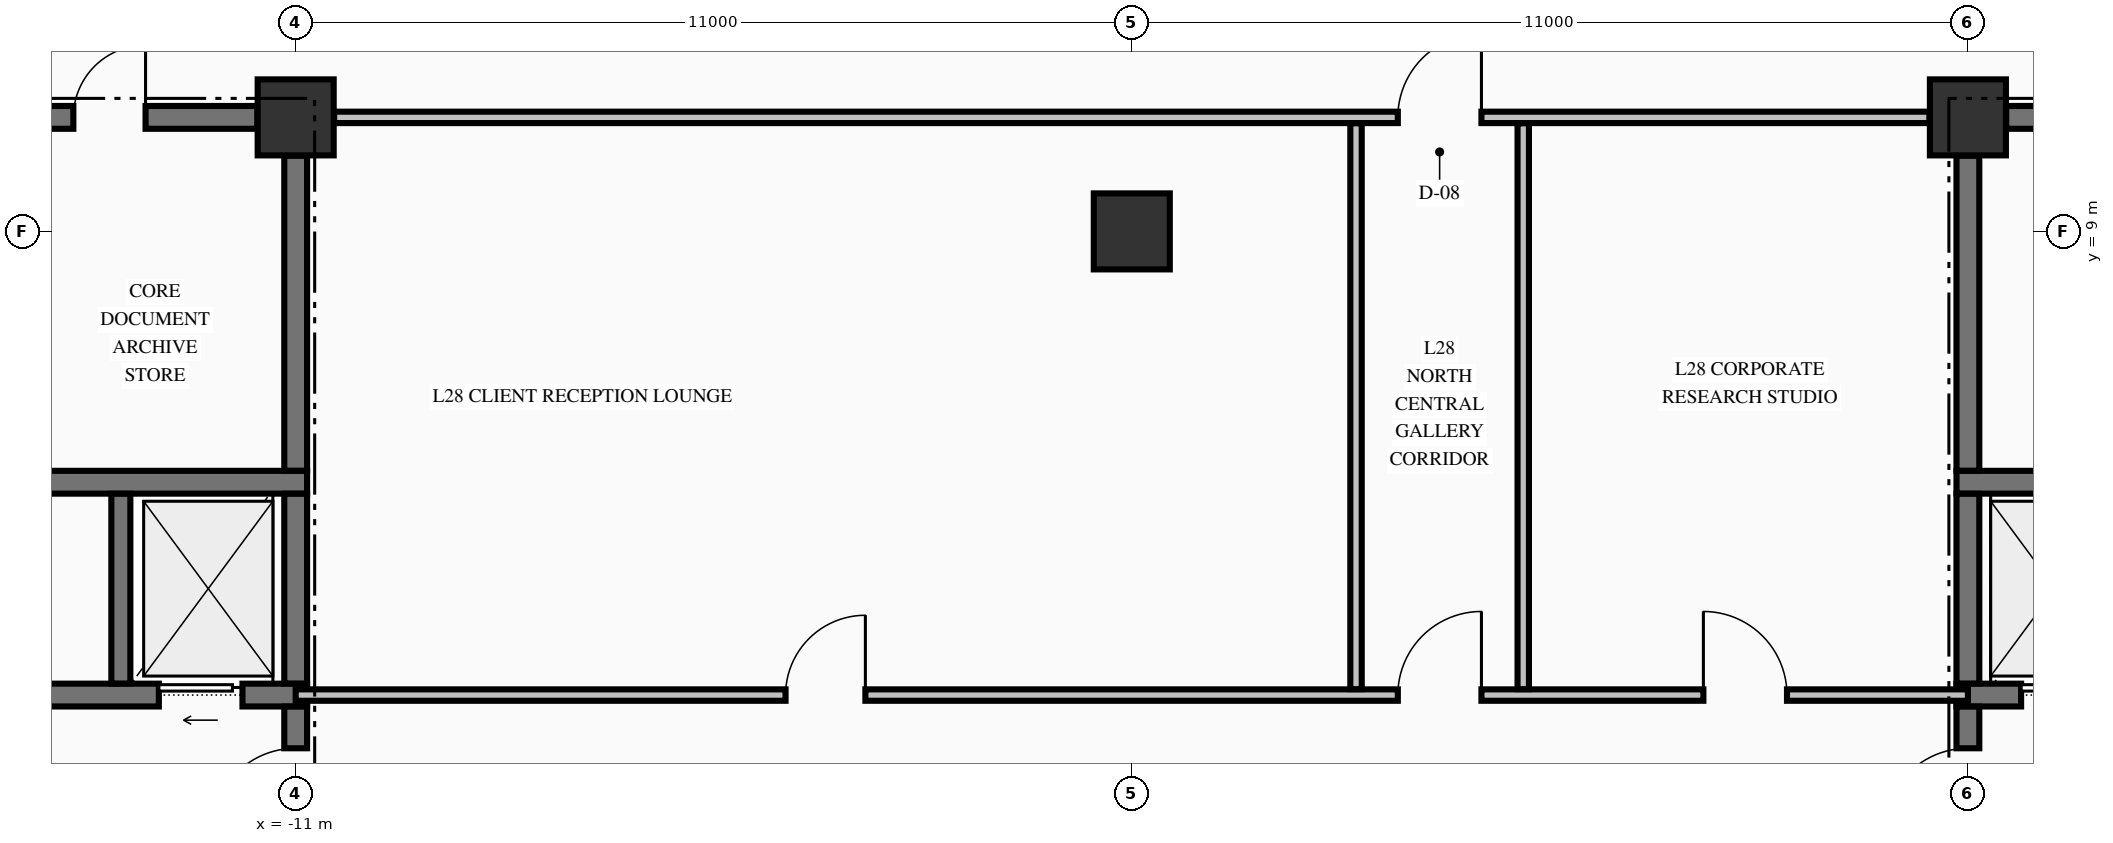
"""IFC4 building model, lengths in metres.
Left out: names, types, materials, properties, quantities, classifications, styles, units other than length and angle.
Written with IfcOpenShell. Run it as: python <this file> out.ifc"""

import sys

from ifc_helpers import new_model, si_unit, direction, frame, frame_2d, origin, origin_2d, place, context, subcontext, project, spatial, rectangle, extrude, element, fill, save


model = new_model("IFC4")
c1 = context("Model", 3, precision=1e-05, world=origin(), true_north=direction((0.0, 1.0)))
c2 = subcontext(c1, "Body", "Model", "MODEL_VIEW")
j1 = project(units=[si_unit("LENGTHUNIT", "METRE"), si_unit("PLANEANGLEUNIT", "RADIAN")], contexts=[c1])
p1 = place(None, origin())
s1 = spatial("IfcSite", under=j1, at=p1, CompositionType="ELEMENT")
p2 = place(p1, origin())
s2 = spatial("IfcBuilding", under=s1, at=p2, CompositionType="ELEMENT")
p3 = place(p2, frame((0.0, 0.0, 112.78)))
s3 = spatial("IfcBuildingStorey", under=s2, at=p3, CompositionType="ELEMENT", Elevation=112.78)
for number, where, z_axis, x_axis in (
    (1, (-11.0, 10.5, -0.25), (0.0, 0.0, 1.0), (1.0, 0.0, 0.0)),
    (2, (11.0, 10.5, -0.25), (0.0, 0.0, 1.0), (1.0, 0.0, 0.0)),
    (3, (0.0, 9.0, -0.25), (0.0, 0.0, 1.0), (1.0, 0.0, 0.0)),
):
    element("IfcColumn", number, at=place(p3, frame(where, z_axis=z_axis, x_axis=x_axis)), inside=s3, PredefinedType="COLUMN", context=c2, shape_type="SweptSolid", body=[
        extrude(rectangle(XDim=1.0, YDim=1.0, at=origin_2d()), origin(), (0.0, 0.0, 1.0), 3.395),
    ])
p4 = place(p3, frame((-14.875, 2.9, 0.0), z_axis=(0.0, 0.0, 1.0), x_axis=(1.0, 0.0, 0.0)))
e4 = element("IfcWall", 4, at=p4, inside=s3, PredefinedType="SHEAR", context=c2, shape_type="SweptSolid", body=[
    extrude(rectangle(XDim=4.025, YDim=0.3, at=frame_2d((2.012, 0.0))), origin(), (0.0, 0.0, 1.0), 3.145),
])
p5 = place(p4, frame((2.075, 0.0, 0.0)))
e5 = element("IfcOpeningElement", 5, at=p5, cuts=e4, PredefinedType="OPENING", context=c2, shape_type="SweptSolid", body=[
    extrude(rectangle(XDim=1.1, YDim=2.2, at=frame_2d((0.55, 1.1))), frame((0.0, 0.16, 0.0), z_axis=(0.0, -1.0, 0.0), x_axis=(1.0, 0.0, 0.0)), (0.0, 0.0, 1.0), 0.32),
])
p6 = place(p3, frame((10.85, 2.9, 0.0), z_axis=(0.0, 0.0, 1.0), x_axis=(1.0, 0.0, 0.0)))
e6 = element("IfcWall", 6, at=p6, inside=s3, PredefinedType="SHEAR", context=c2, shape_type="SweptSolid", body=[
    extrude(rectangle(XDim=4.025, YDim=0.3, at=frame_2d((2.012, 0.0))), origin(), (0.0, 0.0, 1.0), 3.145),
])
p7 = place(p6, frame((0.85, 0.0, 0.0)))
e7 = element("IfcOpeningElement", 7, at=p7, cuts=e6, PredefinedType="OPENING", context=c2, shape_type="SweptSolid", body=[
    extrude(rectangle(XDim=1.1, YDim=2.2, at=frame_2d((0.55, 1.1))), frame((0.0, 0.16, 0.0), z_axis=(0.0, -1.0, 0.0), x_axis=(1.0, 0.0, 0.0)), (0.0, 0.0, 1.0), 0.32),
])
for number, where, z_axis, x_axis in (
    (8, (-14.875, 5.7, 0.0), (0.0, 0.0, 1.0), (1.0, 0.0, 0.0)),
    (9, (10.85, 5.7, 0.0), (0.0, 0.0, 1.0), (1.0, 0.0, 0.0)),
):
    element("IfcWall", number, at=place(p3, frame(where, z_axis=z_axis, x_axis=x_axis)), inside=s3, PredefinedType="SHEAR", context=c2, shape_type="SweptSolid", body=[
        extrude(rectangle(XDim=4.025, YDim=0.3, at=frame_2d((2.012, 0.0))), origin(), (0.0, 0.0, 1.0), 3.145),
    ])
p8 = place(p3, frame((-14.7, 10.5, 0.0), z_axis=(0.0, 0.0, 1.0), x_axis=(1.0, 0.0, 0.0)))
e10 = element("IfcWall", 10, at=p8, inside=s3, PredefinedType="SHEAR", context=c2, shape_type="SweptSolid", body=[
    extrude(rectangle(XDim=3.196, YDim=0.3, at=frame_2d((1.598, 0.0))), origin(), (0.0, 0.0, 1.0), 3.145),
])
p9 = place(p8, frame((0.775, 0.0, 0.0)))
e11 = element("IfcOpeningElement", 11, at=p9, cuts=e10, PredefinedType="OPENING", context=c2, shape_type="SweptSolid", body=[
    extrude(rectangle(XDim=0.95, YDim=2.15, at=frame_2d((0.475, 1.075))), frame((0.0, 0.16, 0.0), z_axis=(0.0, -1.0, 0.0), x_axis=(1.0, 0.0, 0.0)), (0.0, 0.0, 1.0), 0.32),
])
p10 = place(p3, frame((11.504, 10.5, 0.0), z_axis=(0.0, 0.0, 1.0), x_axis=(1.0, 0.0, 0.0)))
e12 = element("IfcWall", 12, at=p10, inside=s3, PredefinedType="SHEAR", context=c2, shape_type="SweptSolid", body=[
    extrude(rectangle(XDim=3.196, YDim=0.3, at=frame_2d((1.598, 0.0))), origin(), (0.0, 0.0, 1.0), 3.145),
])
p11 = place(p10, frame((2.001, 0.0, 0.0)))
e13 = element("IfcOpeningElement", 13, at=p11, cuts=e12, PredefinedType="OPENING", context=c2, shape_type="SweptSolid", body=[
    extrude(rectangle(XDim=0.95, YDim=2.15, at=frame_2d((0.475, 1.075))), frame((0.0, 0.16, 0.0), z_axis=(0.0, -1.0, 0.0), x_axis=(1.0, 0.0, 0.0)), (0.0, 0.0, 1.0), 0.32),
])
p12 = place(p3, frame((-11.0, 2.9, 0.0), z_axis=(0.0, 0.0, 1.0), x_axis=(1.0, 0.0, 0.0)))
e14 = element("IfcWall", 14, at=p12, inside=s3, PredefinedType="PARTITIONING", context=c2, shape_type="SweptSolid", body=[
    extrude(rectangle(XDim=22.0, YDim=0.15, at=frame_2d((11.0, 0.0))), origin(), (0.0, 0.0, 1.0), 3.145),
])
p13 = place(p12, frame((14.5, 0.0, 0.0)))
e15 = element("IfcOpeningElement", 15, at=p13, cuts=e14, PredefinedType="OPENING", context=c2, shape_type="SweptSolid", body=[
    extrude(rectangle(XDim=1.1, YDim=2.15, at=frame_2d((0.55, 1.075))), frame((0.0, 0.085, 0.0), z_axis=(0.0, -1.0, 0.0), x_axis=(1.0, 0.0, 0.0)), (0.0, 0.0, 1.0), 0.17),
])
p14 = place(p12, frame((6.445, 0.0, 0.0)))
e16 = element("IfcOpeningElement", 16, at=p14, cuts=e14, PredefinedType="OPENING", context=c2, shape_type="SweptSolid", body=[
    extrude(rectangle(XDim=1.05, YDim=2.15, at=frame_2d((0.525, 1.075))), frame((0.0, 0.085, 0.0), z_axis=(0.0, -1.0, 0.0), x_axis=(1.0, 0.0, 0.0)), (0.0, 0.0, 1.0), 0.17),
])
p15 = place(p12, frame((18.52, 0.0, 0.0)))
e17 = element("IfcOpeningElement", 17, at=p15, cuts=e14, PredefinedType="OPENING", context=c2, shape_type="SweptSolid", body=[
    extrude(rectangle(XDim=1.1, YDim=2.15, at=frame_2d((0.55, 1.075))), frame((0.0, 0.085, 0.0), z_axis=(0.0, -1.0, 0.0), x_axis=(1.0, 0.0, 0.0)), (0.0, 0.0, 1.0), 0.17),
])
p16 = place(p3, frame((-10.494, 10.5, 0.0), z_axis=(0.0, 0.0, 1.0), x_axis=(1.0, 0.0, 0.0)))
e18 = element("IfcWall", 18, at=p16, inside=s3, PredefinedType="PARTITIONING", context=c2, shape_type="SweptSolid", body=[
    extrude(rectangle(XDim=20.988, YDim=0.15, at=frame_2d((10.494, 0.0))), origin(), (0.0, 0.0, 1.0), 3.145),
])
p17 = place(p16, frame((13.994, 0.0, 0.0)))
e19 = element("IfcOpeningElement", 19, at=p17, cuts=e18, PredefinedType="OPENING", context=c2, shape_type="SweptSolid", body=[
    extrude(rectangle(XDim=1.1, YDim=2.15, at=frame_2d((0.55, 1.075))), frame((0.0, 0.085, 0.0), z_axis=(0.0, -1.0, 0.0), x_axis=(1.0, 0.0, 0.0)), (0.0, 0.0, 1.0), 0.17),
])
p18 = place(p3, frame((-13.3, 3.052, 0.0), z_axis=(0.0, 0.0, 1.0), x_axis=(0.0, 1.0, 0.0)))
e20 = element("IfcWall", 20, at=p18, inside=s3, PredefinedType="SOLIDWALL", context=c2, shape_type="SweptSolid", body=[
    extrude(rectangle(XDim=2.496, YDim=0.25, at=frame_2d((1.248, 0.0))), origin(), (0.0, 0.0, 1.0), 3.145),
])
p19 = place(p3, frame((-11.0, 0.504, 0.0), z_axis=(0.0, 0.0, 1.0), x_axis=(0.0, 1.0, 0.0)))
e21 = element("IfcWall", 21, at=p19, inside=s3, PredefinedType="SHEAR", context=c2, shape_type="SweptSolid", body=[
    extrude(rectangle(XDim=2.244, YDim=0.3, at=frame_2d((1.122, 0.0))), origin(), (0.0, 0.0, 1.0), 3.145),
])
p20 = place(p19, frame((0.596, 0.0, 0.0)))
e22 = element("IfcOpeningElement", 22, at=p20, cuts=e21, PredefinedType="OPENING", context=c2, shape_type="SweptSolid", body=[
    extrude(rectangle(XDim=1.1, YDim=2.15, at=frame_2d((0.55, 1.075))), frame((0.0, 0.16, 0.0), z_axis=(0.0, -1.0, 0.0), x_axis=(1.0, 0.0, 0.0)), (0.0, 0.0, 1.0), 0.32),
])
p21 = place(p3, frame((-11.0, 3.052, 0.0), z_axis=(0.0, 0.0, 1.0), x_axis=(0.0, 1.0, 0.0)))
e23 = element("IfcWall", 23, at=p21, inside=s3, PredefinedType="SHEAR", context=c2, shape_type="SweptSolid", body=[
    extrude(rectangle(XDim=2.496, YDim=0.3, at=frame_2d((1.248, 0.0))), origin(), (0.0, 0.0, 1.0), 3.145),
])
p22 = place(p3, frame((-11.0, 5.852, 0.0), z_axis=(0.0, 0.0, 1.0), x_axis=(0.0, 1.0, 0.0)))
e24 = element("IfcWall", 24, at=p22, inside=s3, PredefinedType="SHEAR", context=c2, shape_type="SweptSolid", body=[
    extrude(rectangle(XDim=4.144, YDim=0.3, at=frame_2d((2.072, 0.0))), origin(), (0.0, 0.0, 1.0), 3.145),
])
p23 = place(p3, frame((11.0, 0.504, 0.0), z_axis=(0.0, 0.0, 1.0), x_axis=(0.0, 1.0, 0.0)))
e25 = element("IfcWall", 25, at=p23, inside=s3, PredefinedType="SHEAR", context=c2, shape_type="SweptSolid", body=[
    extrude(rectangle(XDim=2.244, YDim=0.3, at=frame_2d((1.122, 0.0))), origin(), (0.0, 0.0, 1.0), 3.145),
])
p24 = place(p23, frame((0.596, 0.0, 0.0)))
e26 = element("IfcOpeningElement", 26, at=p24, cuts=e25, PredefinedType="OPENING", context=c2, shape_type="SweptSolid", body=[
    extrude(rectangle(XDim=1.1, YDim=2.15, at=frame_2d((0.55, 1.075))), frame((0.0, 0.16, 0.0), z_axis=(0.0, -1.0, 0.0), x_axis=(1.0, 0.0, 0.0)), (0.0, 0.0, 1.0), 0.32),
])
p25 = place(p3, frame((11.0, 3.052, 0.0), z_axis=(0.0, 0.0, 1.0), x_axis=(0.0, 1.0, 0.0)))
e27 = element("IfcWall", 27, at=p25, inside=s3, PredefinedType="SHEAR", context=c2, shape_type="SweptSolid", body=[
    extrude(rectangle(XDim=2.496, YDim=0.3, at=frame_2d((1.248, 0.0))), origin(), (0.0, 0.0, 1.0), 3.145),
])
p26 = place(p3, frame((11.0, 5.852, 0.0), z_axis=(0.0, 0.0, 1.0), x_axis=(0.0, 1.0, 0.0)))
e28 = element("IfcWall", 28, at=p26, inside=s3, PredefinedType="SHEAR", context=c2, shape_type="SweptSolid", body=[
    extrude(rectangle(XDim=4.144, YDim=0.3, at=frame_2d((2.072, 0.0))), origin(), (0.0, 0.0, 1.0), 3.145),
])
for number, where, z_axis, x_axis in (
    (29, (2.95, 2.978, 0.0), (0.0, 0.0, 1.0), (0.0, 1.0, 0.0)),
    (30, (5.15, 2.978, 0.0), (0.0, 0.0, 1.0), (0.0, 1.0, 0.0)),
):
    element("IfcWall", number, at=place(p3, frame(where, z_axis=z_axis, x_axis=x_axis)), inside=s3, PredefinedType="PARTITIONING", context=c2, shape_type="SweptSolid", body=[
        extrude(rectangle(XDim=7.444, YDim=0.15, at=frame_2d((3.722, 0.0))), origin(), (0.0, 0.0, 1.0), 3.145),
    ])
p27 = place(p20, origin())
e31 = element("IfcDoor", 31, at=p27, inside=s3, OperationType="SINGLE_SWING_LEFT", PredefinedType="DOOR", context=c2, shape_type="SweptSolid", body=[
    extrude(rectangle(XDim=1.1, YDim=2.15, at=frame_2d((0.55, 1.075))), frame((0.0, 0.025, 0.0), z_axis=(0.0, -1.0, 0.0), x_axis=(1.0, 0.0, 0.0)), (0.0, 0.0, 1.0), 0.05),
])
fill(e22, e31)
p28 = place(p5, origin())
e32 = element("IfcDoor", 32, at=p28, inside=s3, OperationType="SLIDING_TO_LEFT", PredefinedType="DOOR", context=c2, shape_type="SweptSolid", body=[
    extrude(rectangle(XDim=1.1, YDim=2.2, at=frame_2d((0.55, 1.1))), frame((0.0, 0.025, 0.0), z_axis=(0.0, -1.0, 0.0), x_axis=(1.0, 0.0, 0.0)), (0.0, 0.0, 1.0), 0.05),
])
fill(e5, e32)
p29 = place(p24, origin())
e33 = element("IfcDoor", 33, at=p29, inside=s3, OperationType="SINGLE_SWING_LEFT", PredefinedType="DOOR", context=c2, shape_type="SweptSolid", body=[
    extrude(rectangle(XDim=1.1, YDim=2.15, at=frame_2d((0.55, 1.075))), frame((0.0, 0.025, 0.0), z_axis=(0.0, -1.0, 0.0), x_axis=(1.0, 0.0, 0.0)), (0.0, 0.0, 1.0), 0.05),
])
fill(e26, e33)
p30 = place(p7, origin())
e34 = element("IfcDoor", 34, at=p30, inside=s3, OperationType="SLIDING_TO_RIGHT", PredefinedType="DOOR", context=c2, shape_type="SweptSolid", body=[
    extrude(rectangle(XDim=1.1, YDim=2.2, at=frame_2d((0.55, 1.1))), frame((0.0, 0.025, 0.0), z_axis=(0.0, -1.0, 0.0), x_axis=(1.0, 0.0, 0.0)), (0.0, 0.0, 1.0), 0.05),
])
fill(e7, e34)
p31 = place(p9, origin())
e35 = element("IfcDoor", 35, at=p31, inside=s3, OperationType="SINGLE_SWING_RIGHT", PredefinedType="DOOR", context=c2, shape_type="SweptSolid", body=[
    extrude(rectangle(XDim=0.95, YDim=2.15, at=frame_2d((0.475, 1.075))), frame((0.0, 0.025, 0.0), z_axis=(0.0, -1.0, 0.0), x_axis=(1.0, 0.0, 0.0)), (0.0, 0.0, 1.0), 0.05),
])
fill(e11, e35)
p32 = place(p17, origin())
e36 = element("IfcDoor", 36, at=p32, inside=s3, OperationType="SINGLE_SWING_RIGHT", PredefinedType="DOOR", context=c2, shape_type="SweptSolid", body=[
    extrude(rectangle(XDim=1.1, YDim=2.15, at=frame_2d((0.55, 1.075))), frame((0.0, 0.025, 0.0), z_axis=(0.0, -1.0, 0.0), x_axis=(1.0, 0.0, 0.0)), (0.0, 0.0, 1.0), 0.05),
])
fill(e19, e36)
p33 = place(p13, origin())
e37 = element("IfcDoor", 37, at=p33, inside=s3, OperationType="SINGLE_SWING_RIGHT", PredefinedType="DOOR", context=c2, shape_type="SweptSolid", body=[
    extrude(rectangle(XDim=1.1, YDim=2.15, at=frame_2d((0.55, 1.075))), frame((0.0, 0.025, 0.0), z_axis=(0.0, -1.0, 0.0), x_axis=(1.0, 0.0, 0.0)), (0.0, 0.0, 1.0), 0.05),
])
fill(e15, e37)
p34 = place(p14, origin())
e38 = element("IfcDoor", 38, at=p34, inside=s3, OperationType="SINGLE_SWING_RIGHT", PredefinedType="DOOR", context=c2, shape_type="SweptSolid", body=[
    extrude(rectangle(XDim=1.05, YDim=2.15, at=frame_2d((0.525, 1.075))), frame((0.0, 0.025, 0.0), z_axis=(0.0, -1.0, 0.0), x_axis=(1.0, 0.0, 0.0)), (0.0, 0.0, 1.0), 0.05),
])
fill(e16, e38)
p35 = place(p15, origin())
e39 = element("IfcDoor", 39, at=p35, inside=s3, OperationType="SINGLE_SWING_LEFT", PredefinedType="DOOR", context=c2, shape_type="SweptSolid", body=[
    extrude(rectangle(XDim=1.1, YDim=2.15, at=frame_2d((0.55, 1.075))), frame((0.0, 0.025, 0.0), z_axis=(0.0, -1.0, 0.0), x_axis=(1.0, 0.0, 0.0)), (0.0, 0.0, 1.0), 0.05),
])
fill(e17, e39)
save(model, sys.argv[1])
